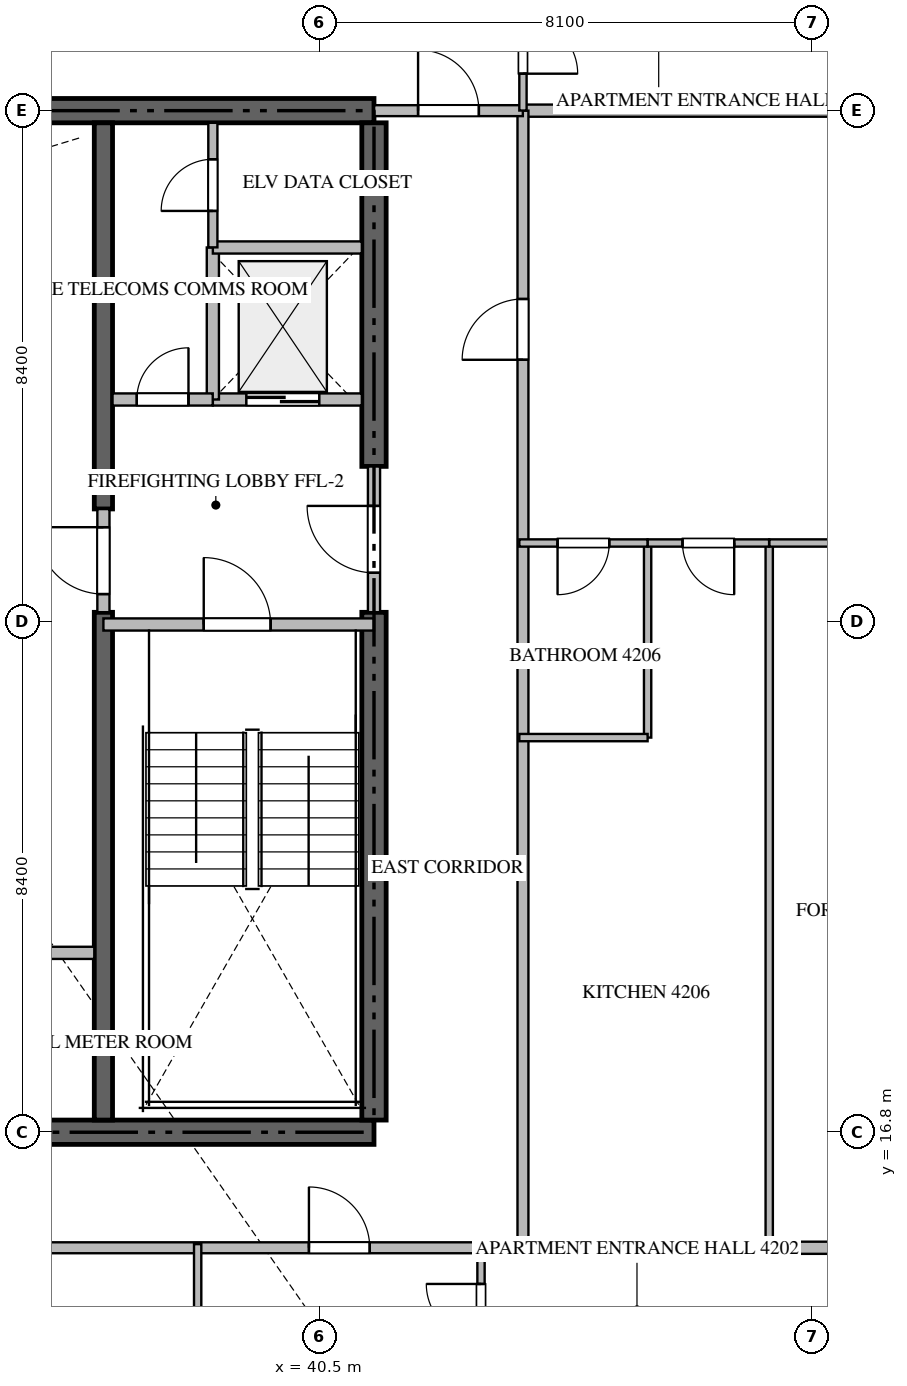
"""IFC4 building model, lengths in metres.
Left out: names, types, materials, properties, quantities, classifications, styles, units other than length and angle.
Written with IfcOpenShell. Run it as: python <this file> out.ifc"""

import sys

from ifc_helpers import new_model, si_unit, direction, frame, frame_2d, origin, place, context, subcontext, project, spatial, rectangle, extrude, source, transform, mapped, element, fill, save


model = new_model("IFC4")
c1 = context("Model", 3, precision=1e-05, world=origin(), true_north=direction((0.0, 1.0)))
c2 = subcontext(c1, "Body", "Model", "MODEL_VIEW")
j1 = project(units=[si_unit("LENGTHUNIT", "METRE"), si_unit("PLANEANGLEUNIT", "RADIAN")], contexts=[c1])
p1 = place(None, origin())
s1 = spatial("IfcSite", under=j1, at=p1, CompositionType="ELEMENT")
p2 = place(p1, origin())
s2 = spatial("IfcBuilding", under=s1, at=p2, CompositionType="ELEMENT")
p3 = place(p2, frame((0.0, 0.0, 168.9)))
s3 = spatial("IfcBuildingStorey", under=s2, at=p3, CompositionType="ELEMENT", Elevation=168.9)
for number, where, z_axis, x_axis in (
    (1, (23.4, 16.8, -0.26), (0.0, 0.0, 1.0), (1.0, 0.0, 0.0)),
    (2, (41.4, 33.6, -0.26), (0.0, 0.0, 1.0), (-1.0, 0.0, 0.0)),
):
    element("IfcWall", number, at=place(p3, frame(where, z_axis=z_axis, x_axis=x_axis)), inside=s3, PredefinedType="SHEAR", context=c2, shape_type="SweptSolid", body=[
        extrude(rectangle(XDim=18.0, YDim=0.4, at=frame_2d((9.0, 0.0))), origin(), (0.0, 0.0, 1.0), 3.748),
    ])
p4 = place(p3, frame((41.4, 17.0, -0.26), z_axis=(0.0, 0.0, 1.0), x_axis=(0.0, 1.0, 0.0)))
e3 = element("IfcWall", 3, at=p4, inside=s3, PredefinedType="SHEAR", context=c2, shape_type="SweptSolid", body=[
    extrude(rectangle(XDim=8.35, YDim=0.4, at=frame_2d((4.175, 0.0))), origin(), (0.0, 0.0, 1.0), 3.748),
])
p5 = place(p3, frame((41.4, 27.75, -0.26), z_axis=(0.0, 0.0, 1.0), x_axis=(0.0, 1.0, 0.0)))
e4 = element("IfcWall", 4, at=p5, inside=s3, PredefinedType="SHEAR", context=c2, shape_type="SweptSolid", body=[
    extrude(rectangle(XDim=5.65, YDim=0.4, at=frame_2d((2.825, 0.0))), origin(), (0.0, 0.0, 1.0), 3.748),
])
p6 = place(p3, frame((36.95, 17.0, -0.26), z_axis=(0.0, 0.0, 1.0), x_axis=(0.0, 1.0, 0.0)))
e5 = element("IfcWall", 5, at=p6, inside=s3, PredefinedType="SHEAR", context=c2, shape_type="SweptSolid", body=[
    extrude(rectangle(XDim=8.35, YDim=0.3, at=frame_2d((4.175, 0.0))), origin(), (0.0, 0.0, 1.0), 3.748),
])
p7 = place(p3, frame((36.95, 27.05, -0.26), z_axis=(0.0, 0.0, 1.0), x_axis=(0.0, 1.0, 0.0)))
e6 = element("IfcWall", 6, at=p7, inside=s3, PredefinedType="SHEAR", context=c2, shape_type="SweptSolid", body=[
    extrude(rectangle(XDim=6.35, YDim=0.3, at=frame_2d((3.175, 0.0))), origin(), (0.0, 0.0, 1.0), 3.748),
])
p8 = place(p3, frame((36.95, 25.15, 0.0), z_axis=(0.0, 0.0, 1.0), x_axis=(1.0, 0.0, 0.0)))
e7 = element("IfcWall", 7, at=p8, inside=s3, PredefinedType="STANDARD", context=c2, shape_type="SweptSolid", body=[
    extrude(rectangle(XDim=4.45, YDim=0.2, at=frame_2d((2.225, 0.0))), origin(), (0.0, 0.0, 1.0), 3.49),
])
p9 = place(p8, frame((1.65, 0.0, 0.0)))
e8 = element("IfcOpeningElement", 8, at=p9, cuts=e7, PredefinedType="OPENING", context=c2, shape_type="SweptSolid", body=[
    extrude(rectangle(XDim=1.1, YDim=2.15, at=frame_2d((0.55, 1.075))), frame((0.0, 0.11, 0.0), z_axis=(0.0, -1.0, 0.0), x_axis=(1.0, 0.0, 0.0)), (0.0, 0.0, 1.0), 0.22),
])
p10 = place(p3, frame((38.75, 28.85, 0.0), z_axis=(0.0, 0.0, 1.0), x_axis=(1.0, 0.0, 0.0)))
e9 = element("IfcWall", 9, at=p10, inside=s3, PredefinedType="STANDARD", context=c2, shape_type="SweptSolid", body=[
    extrude(rectangle(XDim=2.45, YDim=0.2, at=frame_2d((1.225, 0.0))), origin(), (0.0, 0.0, 1.0), 3.49),
])
p11 = place(p10, frame((0.55, 0.0, 0.0)))
e10 = element("IfcOpeningElement", 10, at=p11, cuts=e9, PredefinedType="OPENING", context=c2, shape_type="SweptSolid", body=[
    extrude(rectangle(XDim=1.2, YDim=2.2, at=frame_2d((0.6, 1.1))), frame((0.0, 0.11, 0.0), z_axis=(0.0, -1.0, 0.0), x_axis=(1.0, 0.0, 0.0)), (0.0, 0.0, 1.0), 0.22),
])
p12 = place(p3, frame((35.0, 30.65, 0.0), z_axis=(0.0, 0.0, 1.0), x_axis=(1.0, 0.0, 0.0)))
e11 = element("IfcWall", 11, at=p12, inside=s3, PredefinedType="STANDARD", context=c2, shape_type="SweptSolid", body=[
    extrude(rectangle(XDim=1.8, YDim=0.2, at=frame_2d((0.9, 0.0))), origin(), (0.0, 0.0, 1.0), 3.49),
])
p13 = place(p3, frame((38.75, 28.85, 0.0), z_axis=(0.0, 0.0, 1.0), x_axis=(0.0, 1.0, 0.0)))
e12 = element("IfcWall", 12, at=p13, inside=s3, PredefinedType="STANDARD", context=c2, shape_type="SweptSolid", body=[
    extrude(rectangle(XDim=2.5, YDim=0.2, at=frame_2d((1.25, 0.0))), origin(), (0.0, 0.0, 1.0), 3.49),
])
p14 = place(p3, frame((38.75, 31.35, 0.0), z_axis=(0.0, 0.0, 1.0), x_axis=(1.0, 0.0, 0.0)))
e13 = element("IfcWall", 13, at=p14, inside=s3, PredefinedType="STANDARD", context=c2, shape_type="SweptSolid", body=[
    extrude(rectangle(XDim=2.45, YDim=0.2, at=frame_2d((1.225, 0.0))), origin(), (0.0, 0.0, 1.0), 3.49),
])
p15 = place(p3, frame((37.1, 28.85, 0.0), z_axis=(0.0, 0.0, 1.0), x_axis=(1.0, 0.0, 0.0)))
e14 = element("IfcWall", 14, at=p15, inside=s3, PredefinedType="STANDARD", context=c2, shape_type="SweptSolid", body=[
    extrude(rectangle(XDim=1.648, YDim=0.2, at=frame_2d((0.824, 0.0))), origin(), (0.0, 0.0, 1.0), 3.49),
])
p16 = place(p15, frame((0.399, 0.0, 0.0)))
e15 = element("IfcOpeningElement", 15, at=p16, cuts=e14, PredefinedType="OPENING", context=c2, shape_type="SweptSolid", body=[
    extrude(rectangle(XDim=0.85, YDim=2.1, at=frame_2d((0.425, 1.05))), frame((0.0, 0.11, 0.0), z_axis=(0.0, -1.0, 0.0), x_axis=(1.0, 0.0, 0.0)), (0.0, 0.0, 1.0), 0.22),
])
p17 = place(p3, frame((41.4, 25.352, 0.0), z_axis=(0.0, 0.0, 1.0), x_axis=(0.0, 1.0, 0.0)))
e16 = element("IfcWall", 16, at=p17, inside=s3, PredefinedType="STANDARD", context=c2, shape_type="SweptSolid", body=[
    extrude(rectangle(XDim=2.396, YDim=0.2, at=frame_2d((1.198, 0.0))), origin(), (0.0, 0.0, 1.0), 3.49),
])
p18 = place(p17, frame((0.648, 0.0, 0.0)))
e17 = element("IfcOpeningElement", 17, at=p18, cuts=e16, PredefinedType="OPENING", context=c2, shape_type="SweptSolid", body=[
    extrude(rectangle(XDim=1.1, YDim=2.15, at=frame_2d((0.55, 1.075))), frame((0.0, 0.11, 0.0), z_axis=(0.0, -1.0, 0.0), x_axis=(1.0, 0.0, 0.0)), (0.0, 0.0, 1.0), 0.22),
])
p19 = place(p3, frame((36.95, 25.352, 0.0), z_axis=(0.0, 0.0, 1.0), x_axis=(0.0, 1.0, 0.0)))
e18 = element("IfcWall", 18, at=p19, inside=s3, PredefinedType="STANDARD", context=c2, shape_type="SweptSolid", body=[
    extrude(rectangle(XDim=1.696, YDim=0.2, at=frame_2d((0.848, 0.0))), origin(), (0.0, 0.0, 1.0), 3.49),
])
p20 = place(p19, frame((0.298, 0.0, 0.0)))
e19 = element("IfcOpeningElement", 19, at=p20, cuts=e18, PredefinedType="OPENING", context=c2, shape_type="SweptSolid", body=[
    extrude(rectangle(XDim=1.1, YDim=2.15, at=frame_2d((0.55, 1.075))), frame((0.0, 0.11, 0.0), z_axis=(0.0, -1.0, 0.0), x_axis=(1.0, 0.0, 0.0)), (0.0, 0.0, 1.0), 0.22),
])
p21 = place(p3, frame((38.75, 31.352, 0.0), z_axis=(0.0, 0.0, 1.0), x_axis=(0.0, 1.0, 0.0)))
e20 = element("IfcWall", 20, at=p21, inside=s3, PredefinedType="PARTITIONING", context=c2, shape_type="SweptSolid", body=[
    extrude(rectangle(XDim=2.048, YDim=0.15, at=frame_2d((1.024, 0.0))), origin(), (0.0, 0.0, 1.0), 3.49),
])
p22 = place(p21, frame((0.599, 0.0, 0.0)))
e21 = element("IfcOpeningElement", 21, at=p22, cuts=e20, PredefinedType="OPENING", context=c2, shape_type="SweptSolid", body=[
    extrude(rectangle(XDim=0.85, YDim=2.1, at=frame_2d((0.425, 1.05))), frame((0.0, 0.085, 0.0), z_axis=(0.0, -1.0, 0.0), x_axis=(1.0, 0.0, 0.0)), (0.0, 0.0, 1.0), 0.17),
])
p23 = place(p3, frame((31.902, 19.75, 0.0), z_axis=(0.0, 0.0, 1.0), x_axis=(1.0, 0.0, 0.0)))
e22 = element("IfcWall", 22, at=p23, inside=s3, PredefinedType="STANDARD", context=c2, shape_type="SweptSolid", body=[
    extrude(rectangle(XDim=4.898, YDim=0.2, at=frame_2d((2.449, 0.0))), origin(), (0.0, 0.0, 1.0), 3.49),
])
p24 = place(p23, frame((1.999, 0.0, 0.0)))
e23 = element("IfcOpeningElement", 23, at=p24, cuts=e22, PredefinedType="OPENING", context=c2, shape_type="SweptSolid", body=[
    extrude(rectangle(XDim=0.9, YDim=2.1, at=frame_2d((0.45, 1.05))), frame((0.0, 0.11, 0.0), z_axis=(0.0, -1.0, 0.0), x_axis=(1.0, 0.0, 0.0)), (0.0, 0.0, 1.0), 0.22),
])
for number, where, z_axis, x_axis in (
    (24, (43.85, 14.9, 0.0), (0.0, 0.0, 1.0), (1.0, 0.0, 0.0)),
    (25, (43.85, 33.6, 0.0), (0.0, 0.0, 1.0), (1.0, 0.0, 0.0)),
):
    element("IfcWall", number, at=place(p3, frame(where, z_axis=z_axis, x_axis=x_axis)), inside=s3, PredefinedType="PARTITIONING", context=c2, shape_type="SweptSolid", body=[
        extrude(rectangle(XDim=13.068, YDim=0.2, at=frame_2d((6.534, 0.0))), origin(), (0.0, 0.0, 1.0), 3.49),
    ])
p25 = place(p3, frame((20.952, 14.9, 0.0), z_axis=(0.0, 0.0, 1.0), x_axis=(1.0, 0.0, 0.0)))
e26 = element("IfcWall", 26, at=p25, inside=s3, PredefinedType="PARTITIONING", context=c2, shape_type="SweptSolid", body=[
    extrude(rectangle(XDim=22.896, YDim=0.18, at=frame_2d((11.448, 0.0))), origin(), (0.0, 0.0, 1.0), 3.49),
])
p26 = place(p25, frame((5.452, 0.0, 0.0)))
e27 = element("IfcOpeningElement", 27, at=p26, cuts=e26, PredefinedType="OPENING", context=c2, shape_type="SweptSolid", body=[
    extrude(rectangle(XDim=1.0, YDim=2.15, at=frame_2d((0.5, 1.075))), frame((0.0, 0.1, 0.0), z_axis=(0.0, -1.0, 0.0), x_axis=(1.0, 0.0, 0.0)), (0.0, 0.0, 1.0), 0.2),
])
p27 = place(p25, frame((19.378, 0.0, 0.0)))
e28 = element("IfcOpeningElement", 28, at=p27, cuts=e26, PredefinedType="OPENING", context=c2, shape_type="SweptSolid", body=[
    extrude(rectangle(XDim=1.0, YDim=2.15, at=frame_2d((0.5, 1.075))), frame((0.0, 0.1, 0.0), z_axis=(0.0, -1.0, 0.0), x_axis=(1.0, 0.0, 0.0)), (0.0, 0.0, 1.0), 0.2),
])
p28 = place(p3, frame((43.85, 14.9, 0.0), z_axis=(0.0, 0.0, 1.0), x_axis=(0.0, 1.0, 0.0)))
e29 = element("IfcWall", 29, at=p28, inside=s3, PredefinedType="PARTITIONING", context=c2, shape_type="SweptSolid", body=[
    extrude(rectangle(XDim=18.7, YDim=0.18, at=frame_2d((9.35, 0.0))), origin(), (0.0, 0.0, 1.0), 3.49),
])
p29 = place(p28, frame((14.603, 0.0, 0.0)))
e30 = element("IfcOpeningElement", 30, at=p29, cuts=e29, PredefinedType="OPENING", context=c2, shape_type="SweptSolid", body=[
    extrude(rectangle(XDim=1.0, YDim=2.15, at=frame_2d((0.5, 1.075))), frame((0.0, 0.1, 0.0), z_axis=(0.0, -1.0, 0.0), x_axis=(1.0, 0.0, 0.0)), (0.0, 0.0, 1.0), 0.2),
])
p30 = place(p3, frame((41.402, 33.6, 0.0), z_axis=(0.0, 0.0, 1.0), x_axis=(1.0, 0.0, 0.0)))
e31 = element("IfcWall", 31, at=p30, inside=s3, PredefinedType="PARTITIONING", context=c2, shape_type="SweptSolid", body=[
    extrude(rectangle(XDim=2.446, YDim=0.18, at=frame_2d((1.223, 0.0))), origin(), (0.0, 0.0, 1.0), 3.49),
])
p31 = place(p30, frame((0.723, 0.0, 0.0)))
e32 = element("IfcOpeningElement", 32, at=p31, cuts=e31, PredefinedType="OPENING", context=c2, shape_type="SweptSolid", body=[
    extrude(rectangle(XDim=1.0, YDim=2.15, at=frame_2d((0.5, 1.075))), frame((0.0, 0.1, 0.0), z_axis=(0.0, -1.0, 0.0), x_axis=(1.0, 0.0, 0.0)), (0.0, 0.0, 1.0), 0.2),
])
p32 = place(p3, frame((38.5, 12.15, 0.0), z_axis=(0.0, 0.0, 1.0), x_axis=(0.0, 1.0, 0.0)))
e33 = element("IfcWall", 33, at=p32, inside=s3, PredefinedType="PARTITIONING", context=c2, shape_type="SweptSolid", body=[
    extrude(rectangle(XDim=2.81, YDim=0.12, at=frame_2d((1.405, 0.0))), origin(), (0.0, 0.0, 1.0), 3.49),
])
p33 = place(p3, frame((43.16, 12.75, 0.0), z_axis=(0.0, 0.0, 1.0), x_axis=(0.0, 1.0, 0.0)))
e34 = element("IfcWall", 34, at=p33, inside=s3, PredefinedType="PARTITIONING", context=c2, shape_type="SweptSolid", body=[
    extrude(rectangle(XDim=2.21, YDim=0.12, at=frame_2d((1.105, 0.0))), origin(), (0.0, 0.0, 1.0), 3.49),
])
p34 = place(p33, frame((0.655, 0.0, 0.0)))
e35 = element("IfcOpeningElement", 35, at=p34, cuts=e34, PredefinedType="OPENING", context=c2, shape_type="SweptSolid", body=[
    extrude(rectangle(XDim=0.9, YDim=2.1, at=frame_2d((0.45, 1.05))), frame((0.0, 0.07, 0.0), z_axis=(0.0, -1.0, 0.0), x_axis=(1.0, 0.0, 0.0)), (0.0, 0.0, 1.0), 0.14),
])
p35 = place(p3, frame((43.85, 35.75, 0.0), z_axis=(0.0, 0.0, 1.0), x_axis=(0.0, -1.0, 0.0)))
e36 = element("IfcWall", 36, at=p35, inside=s3, PredefinedType="PARTITIONING", context=c2, shape_type="SweptSolid", body=[
    extrude(rectangle(XDim=2.148, YDim=0.12, at=frame_2d((1.074, 0.0))), origin(), (0.0, 0.0, 1.0), 3.49),
])
p36 = place(p35, frame((0.642, 0.0, 0.0)))
e37 = element("IfcOpeningElement", 37, at=p36, cuts=e36, PredefinedType="OPENING", context=c2, shape_type="SweptSolid", body=[
    extrude(rectangle(XDim=0.9, YDim=2.1, at=frame_2d((0.45, 1.05))), frame((0.0, 0.07, 0.0), z_axis=(0.0, -1.0, 0.0), x_axis=(1.0, 0.0, 0.0)), (0.0, 0.0, 1.0), 0.14),
])
p37 = place(p3, frame((47.9, 14.84, 0.0), z_axis=(0.0, 0.0, 1.0), x_axis=(0.0, 1.0, 0.0)))
e38 = element("IfcWall", 38, at=p37, inside=s3, PredefinedType="PARTITIONING", context=c2, shape_type="SweptSolid", body=[
    extrude(rectangle(XDim=11.65, YDim=0.12, at=frame_2d((5.825, 0.0))), origin(), (0.0, 0.0, 1.0), 2.972),
])
p38 = place(p3, frame((45.9, 23.29, 0.0), z_axis=(0.0, 0.0, 1.0), x_axis=(0.0, 1.0, 0.0)))
e39 = element("IfcWall", 39, at=p38, inside=s3, PredefinedType="PARTITIONING", context=c2, shape_type="SweptSolid", body=[
    extrude(rectangle(XDim=3.2, YDim=0.12, at=frame_2d((1.6, 0.0))), origin(), (0.0, 0.0, 1.0), 3.49),
])
p39 = place(p3, frame((45.9, 23.29, 0.0), z_axis=(0.0, 0.0, 1.0), x_axis=(-1.0, 0.0, 0.0)))
e40 = element("IfcWall", 40, at=p39, inside=s3, PredefinedType="PARTITIONING", context=c2, shape_type="SweptSolid", body=[
    extrude(rectangle(XDim=2.11, YDim=0.12, at=frame_2d((1.055, 0.0))), origin(), (0.0, 0.0, 1.0), 3.49),
])
p40 = place(p3, frame((53.039, 26.49, 0.0), z_axis=(0.0, 0.0, 1.0), x_axis=(-1.0, 0.0, 0.0)))
e41 = element("IfcWall", 41, at=p40, inside=s3, PredefinedType="PARTITIONING", context=c2, shape_type="SweptSolid", body=[
    extrude(rectangle(XDim=5.139, YDim=0.12, at=frame_2d((2.57, 0.0))), origin(), (0.0, 0.0, 1.0), 3.49),
])
p41 = place(p40, frame((2.145, 0.0, 0.0)))
e42 = element("IfcOpeningElement", 42, at=p41, cuts=e41, PredefinedType="OPENING", context=c2, shape_type="SweptSolid", body=[
    extrude(rectangle(XDim=0.85, YDim=2.1, at=frame_2d((0.425, 1.05))), frame((0.0, 0.07, 0.0), z_axis=(0.0, -1.0, 0.0), x_axis=(1.0, 0.0, 0.0)), (0.0, 0.0, 1.0), 0.14),
])
p42 = place(p3, frame((47.898, 26.49, 0.0), z_axis=(0.0, 0.0, 1.0), x_axis=(-1.0, 0.0, 0.0)))
e43 = element("IfcWall", 43, at=p42, inside=s3, PredefinedType="PARTITIONING", context=c2, shape_type="SweptSolid", body=[
    extrude(rectangle(XDim=1.998, YDim=0.12, at=frame_2d((0.999, 0.0))), origin(), (0.0, 0.0, 1.0), 3.49),
])
p43 = place(p42, frame((0.574, 0.0, 0.0)))
e44 = element("IfcOpeningElement", 44, at=p43, cuts=e43, PredefinedType="OPENING", context=c2, shape_type="SweptSolid", body=[
    extrude(rectangle(XDim=0.85, YDim=2.1, at=frame_2d((0.425, 1.05))), frame((0.0, 0.07, 0.0), z_axis=(0.0, -1.0, 0.0), x_axis=(1.0, 0.0, 0.0)), (0.0, 0.0, 1.0), 0.14),
])
p44 = place(p3, frame((45.898, 26.49, 0.0), z_axis=(0.0, 0.0, 1.0), x_axis=(-1.0, 0.0, 0.0)))
e45 = element("IfcWall", 45, at=p44, inside=s3, PredefinedType="PARTITIONING", context=c2, shape_type="SweptSolid", body=[
    extrude(rectangle(XDim=2.108, YDim=0.12, at=frame_2d((1.054, 0.0))), origin(), (0.0, 0.0, 1.0), 3.49),
])
p45 = place(p44, frame((0.629, 0.0, 0.0)))
e46 = element("IfcOpeningElement", 46, at=p45, cuts=e45, PredefinedType="OPENING", context=c2, shape_type="SweptSolid", body=[
    extrude(rectangle(XDim=0.85, YDim=2.1, at=frame_2d((0.425, 1.05))), frame((0.0, 0.07, 0.0), z_axis=(0.0, -1.0, 0.0), x_axis=(1.0, 0.0, 0.0)), (0.0, 0.0, 1.0), 0.14),
])
m1 = source(origin(), c2, "Body", "SweptSolid", [
    extrude(rectangle(XDim=1.1, YDim=2.15, at=frame_2d((0.55, 1.075))), frame((0.0, 0.025, 0.0), z_axis=(0.0, -1.0, 0.0), x_axis=(1.0, 0.0, 0.0)), (0.0, 0.0, 1.0), 0.05),
])
p46 = place(p9, origin())
e47 = element("IfcDoor", 47, at=p46, inside=s3, OperationType="SINGLE_SWING_LEFT", PredefinedType="DOOR", context=c2, shape_type="MappedRepresentation", body=[
    mapped(m1, transform((0.0, 0.0, 0.0), scale=1.0)),
])
fill(e8, e47)
m2 = source(origin(), c2, "Body", "SweptSolid", [
    extrude(rectangle(XDim=1.2, YDim=2.2, at=frame_2d((0.6, 1.1))), frame((0.0, 0.025, 0.0), z_axis=(0.0, -1.0, 0.0), x_axis=(1.0, 0.0, 0.0)), (0.0, 0.0, 1.0), 0.05),
])
p47 = place(p11, origin())
e48 = element("IfcDoor", 48, at=p47, inside=s3, OperationType="DOUBLE_DOOR_SLIDING", PredefinedType="DOOR", context=c2, shape_type="MappedRepresentation", body=[
    mapped(m2, transform((0.0, 0.0, 0.0), scale=1.0)),
])
fill(e10, e48)
m3 = source(origin(), c2, "Body", "SweptSolid", [
    extrude(rectangle(XDim=0.85, YDim=2.1, at=frame_2d((0.425, 1.05))), frame((0.0, 0.025, 0.0), z_axis=(0.0, -1.0, 0.0), x_axis=(1.0, 0.0, 0.0)), (0.0, 0.0, 1.0), 0.05),
])
p48 = place(p16, origin())
e49 = element("IfcDoor", 49, at=p48, inside=s3, OperationType="SINGLE_SWING_RIGHT", PredefinedType="DOOR", context=c2, shape_type="MappedRepresentation", body=[
    mapped(m3, transform((0.0, 0.0, 0.0), scale=1.0)),
])
fill(e15, e49)
p49 = place(p18, origin())
e50 = element("IfcDoor", 50, at=p49, inside=s3, OperationType="SINGLE_SWING_RIGHT", PredefinedType="DOOR", context=c2, shape_type="MappedRepresentation", body=[
    mapped(m1, transform((0.0, 0.0, 0.0), scale=1.0)),
])
fill(e17, e50)
p50 = place(p20, origin())
e51 = element("IfcDoor", 51, at=p50, inside=s3, OperationType="SINGLE_SWING_RIGHT", PredefinedType="DOOR", context=c2, shape_type="MappedRepresentation", body=[
    mapped(m1, transform((0.0, 0.0, 0.0), scale=1.0)),
])
fill(e19, e51)
p51 = place(p22, origin())
e52 = element("IfcDoor", 52, at=p51, inside=s3, OperationType="SINGLE_SWING_LEFT", PredefinedType="DOOR", context=c2, shape_type="MappedRepresentation", body=[
    mapped(m3, transform((0.0, 0.0, 0.0), scale=1.0)),
])
fill(e21, e52)
m4 = source(origin(), c2, "Body", "SweptSolid", [
    extrude(rectangle(XDim=1.0, YDim=2.15, at=frame_2d((0.5, 1.075))), frame((0.0, 0.025, 0.0), z_axis=(0.0, -1.0, 0.0), x_axis=(1.0, 0.0, 0.0)), (0.0, 0.0, 1.0), 0.05),
])
p52 = place(p27, origin())
e53 = element("IfcDoor", 53, at=p52, inside=s3, OperationType="SINGLE_SWING_LEFT", PredefinedType="DOOR", context=c2, shape_type="MappedRepresentation", body=[
    mapped(m4, transform((0.0, 0.0, 0.0), scale=1.0)),
])
fill(e28, e53)
p53 = place(p29, origin())
e54 = element("IfcDoor", 54, at=p53, inside=s3, OperationType="SINGLE_SWING_LEFT", PredefinedType="DOOR", context=c2, shape_type="MappedRepresentation", body=[
    mapped(m4, transform((0.0, 0.0, 0.0), scale=1.0)),
])
fill(e30, e54)
p54 = place(p31, origin())
e55 = element("IfcDoor", 55, at=p54, inside=s3, OperationType="SINGLE_SWING_LEFT", PredefinedType="DOOR", context=c2, shape_type="MappedRepresentation", body=[
    mapped(m4, transform((0.0, 0.0, 0.0), scale=1.0)),
])
fill(e32, e55)
m5 = source(origin(), c2, "Body", "SweptSolid", [
    extrude(rectangle(XDim=0.9, YDim=2.1, at=frame_2d((0.45, 1.05))), frame((0.0, 0.025, 0.0), z_axis=(0.0, -1.0, 0.0), x_axis=(1.0, 0.0, 0.0)), (0.0, 0.0, 1.0), 0.05),
])
p55 = place(p34, origin())
e56 = element("IfcDoor", 56, at=p55, inside=s3, OperationType="SINGLE_SWING_RIGHT", PredefinedType="DOOR", context=c2, shape_type="MappedRepresentation", body=[
    mapped(m5, transform((0.0, 0.0, 0.0), scale=1.0)),
])
fill(e35, e56)
p56 = place(p36, origin())
e57 = element("IfcDoor", 57, at=p56, inside=s3, OperationType="SINGLE_SWING_RIGHT", PredefinedType="DOOR", context=c2, shape_type="MappedRepresentation", body=[
    mapped(m5, transform((0.0, 0.0, 0.0), scale=1.0)),
])
fill(e37, e57)
p57 = place(p43, origin())
e58 = element("IfcDoor", 58, at=p57, inside=s3, OperationType="SINGLE_SWING_LEFT", PredefinedType="DOOR", context=c2, shape_type="MappedRepresentation", body=[
    mapped(m3, transform((0.0, 0.0, 0.0), scale=1.0)),
])
fill(e44, e58)
p58 = place(p45, origin())
e59 = element("IfcDoor", 59, at=p58, inside=s3, OperationType="SINGLE_SWING_RIGHT", PredefinedType="DOOR", context=c2, shape_type="MappedRepresentation", body=[
    mapped(m3, transform((0.0, 0.0, 0.0), scale=1.0)),
])
fill(e46, e59)
save(model, sys.argv[1])
